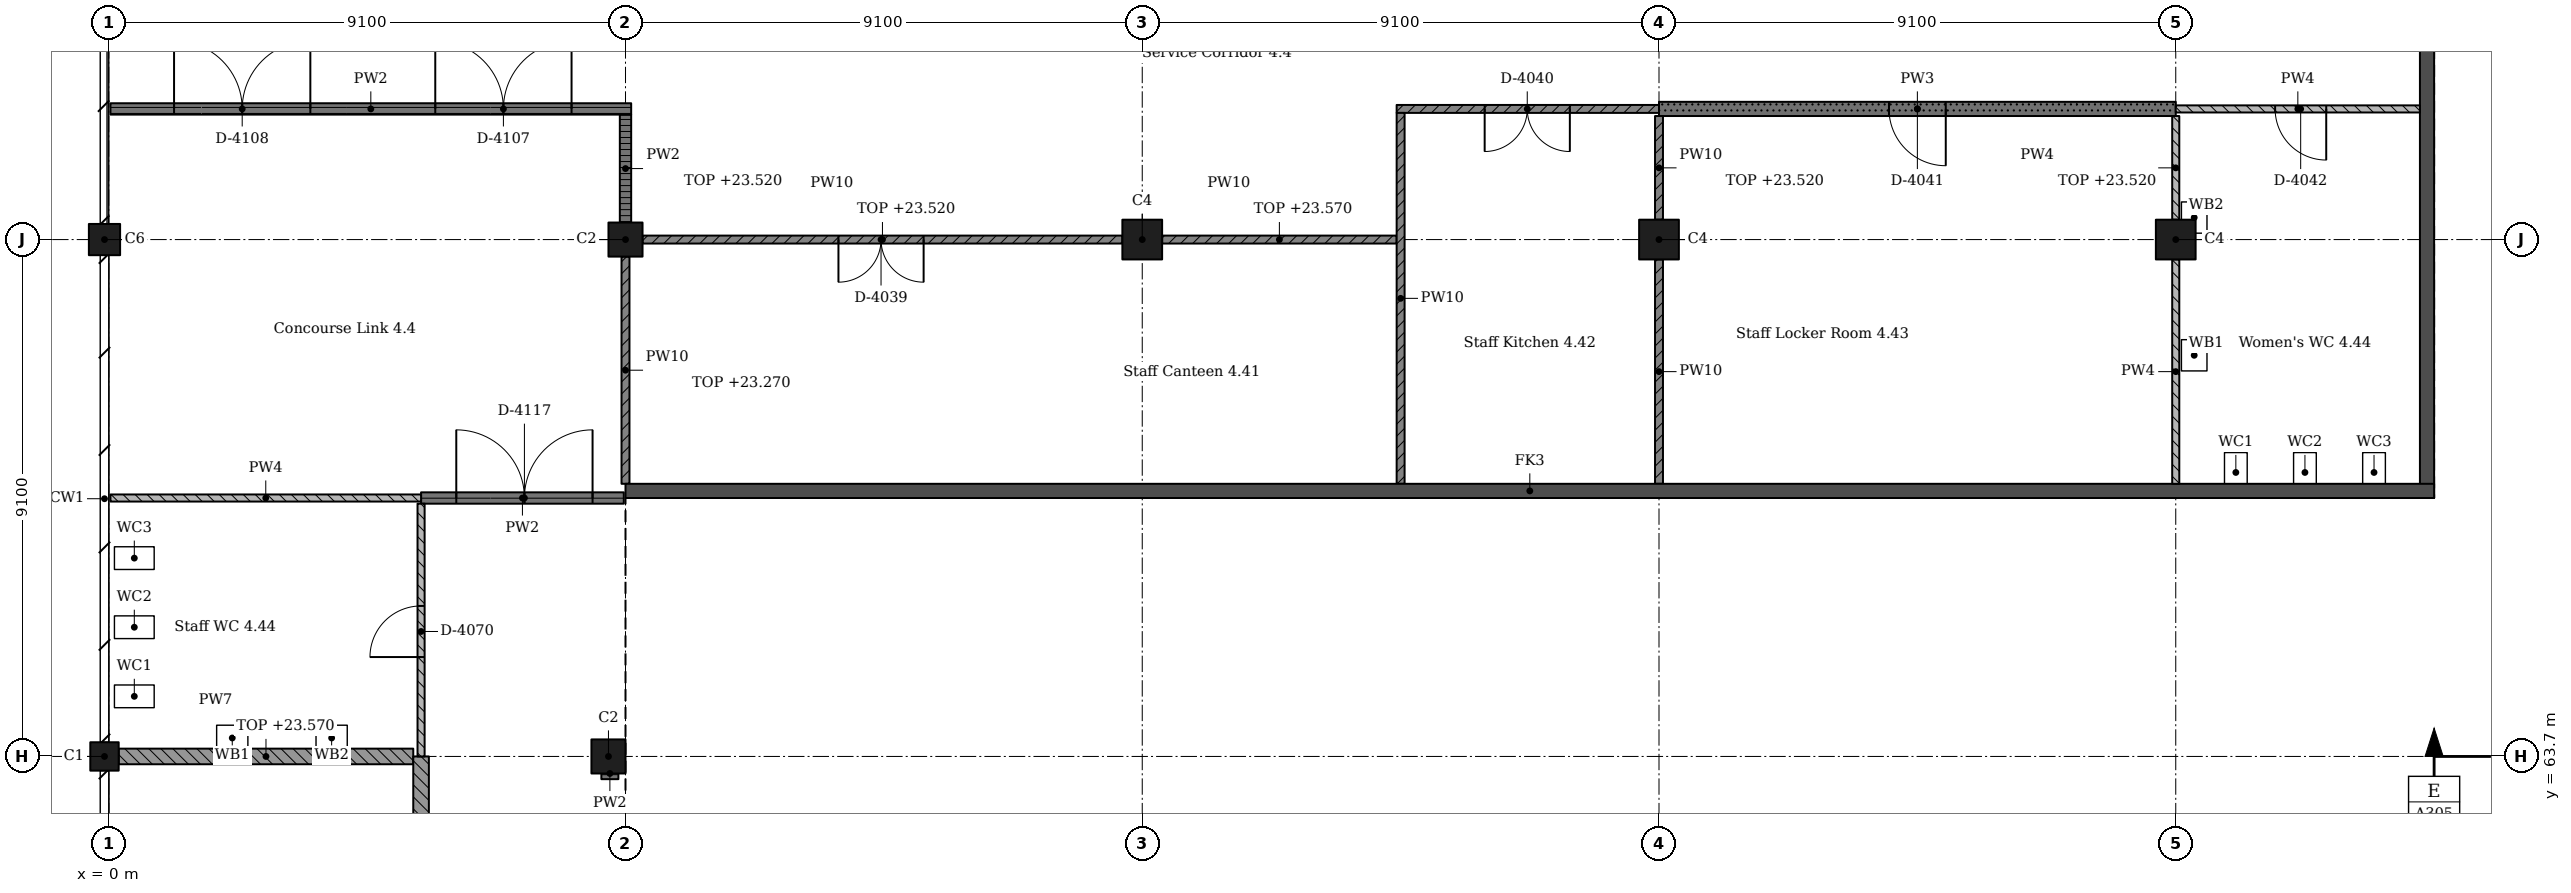
"""IFC4 building model, lengths in metres.
Left out: names, types, materials, properties, quantities, classifications, styles, units other than length and angle.
Written with IfcOpenShell. Run it as: python <this file> out.ifc"""

import sys

from ifc_helpers import new_model, si_unit, direction, frame, frame_2d, origin, origin_2d, place, context, subcontext, project, spatial, rectangle, extrude, element, fill, save


model = new_model("IFC4")
c1 = context("Model", 3, precision=1e-05, world=origin(), true_north=direction((0.0, 1.0)))
c2 = subcontext(c1, "Body", "Model", "MODEL_VIEW")
j1 = project(units=[si_unit("LENGTHUNIT", "METRE"), si_unit("PLANEANGLEUNIT", "RADIAN")], contexts=[c1])
p1 = place(None, origin())
s1 = spatial("IfcSite", under=j1, at=p1, CompositionType="ELEMENT")
p2 = place(p1, origin())
s2 = spatial("IfcBuilding", under=s1, at=p2, CompositionType="ELEMENT")
p3 = place(p2, frame((0.0, 0.0, 20.02)))
s3 = spatial("IfcBuildingStorey", under=s2, at=p3, CompositionType="ELEMENT", Elevation=20.02)
p4 = place(p3, frame((-0.075, 63.7, 0.0), z_axis=(0.0, 0.0, 1.0), x_axis=(1.0, 0.0, 0.0)))
e1 = element("IfcColumn", 1, at=p4, inside=s3, PredefinedType="COLUMN", context=c2, shape_type="SweptSolid", body=[
    extrude(rectangle(XDim=0.5, YDim=0.5, at=origin_2d()), origin(), (0.0, 0.0, 1.0), 4.55),
])
p5 = place(p3, frame((-0.075, 72.8, 0.0), z_axis=(0.0, 0.0, 1.0), x_axis=(1.0, 0.0, 0.0)))
e2 = element("IfcColumn", 2, at=p5, inside=s3, PredefinedType="COLUMN", context=c2, shape_type="SweptSolid", body=[
    extrude(rectangle(XDim=0.55, YDim=0.55, at=origin_2d()), origin(), (0.0, 0.0, 1.0), 4.55),
])
for number, where, z_axis, x_axis in (
    (3, (8.8, 63.7, 0.0), (0.0, 0.0, 1.0), (1.0, 0.0, 0.0)),
    (4, (9.1, 72.8, 0.0), (0.0, 0.0, 1.0), (1.0, 0.0, 0.0)),
):
    element("IfcColumn", number, at=place(p3, frame(where, z_axis=z_axis, x_axis=x_axis)), inside=s3, PredefinedType="COLUMN", context=c2, shape_type="SweptSolid", body=[
        extrude(rectangle(XDim=0.6, YDim=0.6, at=origin_2d()), origin(), (0.0, 0.0, 1.0), 4.55),
    ])
for number, where, z_axis, x_axis in (
    (5, (18.2, 72.8, 0.0), (0.0, 0.0, 1.0), (1.0, 0.0, 0.0)),
    (6, (27.3, 72.8, 0.0), (0.0, 0.0, 1.0), (1.0, 0.0, 0.0)),
    (7, (36.4, 72.8, 0.0), (0.0, 0.0, 1.0), (1.0, 0.0, 0.0)),
):
    element("IfcColumn", number, at=place(p3, frame(where, z_axis=z_axis, x_axis=x_axis)), inside=s3, PredefinedType="COLUMN", context=c2, shape_type="SweptSolid", body=[
        extrude(rectangle(XDim=0.7, YDim=0.7, at=origin_2d()), origin(), (0.0, 0.0, 1.0), 4.55),
    ])
p6 = place(p3, frame((40.825, 68.25, 0.0), z_axis=(0.0, 0.0, 1.0), x_axis=(0.0, 1.0, 0.0)))
e8 = element("IfcWall", 8, at=p6, inside=s3, PredefinedType="SHEAR", context=c2, shape_type="SweptSolid", body=[
    extrude(rectangle(XDim=31.85, YDim=0.25, at=frame_2d((15.925, 0.0))), origin(), (0.0, 0.0, 1.0), 4.55),
])
p7 = place(p3, frame((40.95, 68.375, 0.0), z_axis=(0.0, 0.0, 1.0), x_axis=(-1.0, 0.0, 0.0)))
e9 = element("IfcWall", 9, at=p7, inside=s3, PredefinedType="SHEAR", context=c2, shape_type="SweptSolid", body=[
    extrude(rectangle(XDim=31.85, YDim=0.25, at=frame_2d((15.925, 0.0))), origin(), (0.0, 0.0, 1.0), 4.55),
])
p8 = place(p3, frame((0.175, 63.7, 0.0), z_axis=(0.0, 0.0, 1.0), x_axis=(1.0, 0.0, 0.0)))
e10 = element("IfcWall", 10, at=p8, inside=s3, PredefinedType="SOLIDWALL", context=c2, shape_type="SweptSolid", body=[
    extrude(rectangle(XDim=5.188, YDim=0.275, at=frame_2d((2.594, 0.0))), origin(), (0.0, 0.0, 1.0), 3.55),
])
p9 = place(p3, frame((5.5, 54.6, 0.0), z_axis=(0.0, 0.0, 1.0), x_axis=(0.0, 1.0, 0.0)))
e11 = element("IfcWall", 11, at=p9, inside=s3, PredefinedType="SOLIDWALL", context=c2, shape_type="SweptSolid", body=[
    extrude(rectangle(XDim=9.1, YDim=0.275, at=frame_2d((4.55, 0.0))), origin(), (0.0, 0.0, 1.0), 4.25),
])
p10 = place(p9, frame((3.95, 0.0, 0.0)))
e12 = element("IfcOpeningElement", 12, at=p10, cuts=e11, PredefinedType="OPENING", context=c2, shape_type="SweptSolid", body=[
    extrude(rectangle(XDim=1.2, YDim=2.4, at=frame_2d((0.6, 1.2))), frame((0.0, 0.147, 0.0), z_axis=(0.0, -1.0, 0.0), x_axis=(1.0, 0.0, 0.0)), (0.0, 0.0, 1.0), 0.295),
])
p11 = place(p3, frame((5.5, 63.7, 0.0), z_axis=(0.0, 0.0, 1.0), x_axis=(0.0, 1.0, 0.0)))
e13 = element("IfcWall", 13, at=p11, inside=s3, PredefinedType="PARTITIONING", context=c2, shape_type="SweptSolid", body=[
    extrude(rectangle(XDim=4.45, YDim=0.125, at=frame_2d((2.225, 0.0))), origin(), (0.0, 0.0, 1.0), 4.25),
])
p12 = place(p11, frame((1.75, 0.0, 0.0)))
e14 = element("IfcOpeningElement", 14, at=p12, cuts=e13, PredefinedType="OPENING", context=c2, shape_type="SweptSolid", body=[
    extrude(rectangle(XDim=0.9, YDim=2.1, at=frame_2d((0.45, 1.05))), frame((0.0, 0.073, 0.0), z_axis=(0.0, -1.0, 0.0), x_axis=(1.0, 0.0, 0.0)), (0.0, 0.0, 1.0), 0.145),
])
p13 = place(p3, frame((5.5, 68.25, 0.0), z_axis=(0.0, 0.0, 1.0), x_axis=(-1.0, 0.0, 0.0)))
e15 = element("IfcWall", 15, at=p13, inside=s3, PredefinedType="PARTITIONING", context=c2, shape_type="SweptSolid", body=[
    extrude(rectangle(XDim=5.47, YDim=0.125, at=frame_2d((2.735, 0.0))), origin(), (0.0, 0.0, 1.0), 4.25),
])
p14 = place(p3, frame((8.675, 63.4, 0.0), z_axis=(0.0, 0.0, 1.0), x_axis=(1.0, 0.0, 0.0)))
e16 = element("IfcWall", 16, at=p14, inside=s3, PredefinedType="PARTITIONING", context=c2, shape_type="SweptSolid", body=[
    extrude(rectangle(XDim=0.3, YDim=0.2, at=frame_2d((0.15, 0.0))), origin(), (0.0, 0.0, 1.0), 4.25),
])
p15 = place(p3, frame((9.07, 68.25, 0.0), z_axis=(0.0, 0.0, 1.0), x_axis=(-1.0, 0.0, 0.0)))
e17 = element("IfcWall", 17, at=p15, inside=s3, PredefinedType="PARTITIONING", context=c2, shape_type="SweptSolid", body=[
    extrude(rectangle(XDim=3.57, YDim=0.2, at=frame_2d((1.785, 0.0))), origin(), (0.0, 0.0, 1.0), 4.25),
])
p16 = place(p15, frame((0.55, 0.0, 0.0)))
e18 = element("IfcOpeningElement", 18, at=p16, cuts=e17, PredefinedType="OPENING", context=c2, shape_type="SweptSolid", body=[
    extrude(rectangle(XDim=2.4, YDim=2.4, at=frame_2d((1.2, 1.2))), frame((0.0, 0.11, 0.0), z_axis=(0.0, -1.0, 0.0), x_axis=(1.0, 0.0, 0.0)), (0.0, 0.0, 1.0), 0.22),
])
p17 = place(p3, frame((9.1, 68.5, 0.0), z_axis=(0.0, 0.0, 1.0), x_axis=(0.0, 1.0, 0.0)))
e19 = element("IfcWall", 19, at=p17, inside=s3, PredefinedType="SOLIDWALL", context=c2, shape_type="SweptSolid", body=[
    extrude(rectangle(XDim=4.0, YDim=0.14, at=frame_2d((2.0, 0.0))), origin(), (0.0, 0.0, 1.0), 3.25),
])
p18 = place(p3, frame((9.1, 73.1, 0.0), z_axis=(0.0, 0.0, 1.0), x_axis=(0.0, 1.0, 0.0)))
e20 = element("IfcWall", 20, at=p18, inside=s3, PredefinedType="PARTITIONING", context=c2, shape_type="SweptSolid", body=[
    extrude(rectangle(XDim=1.9, YDim=0.2, at=frame_2d((0.95, 0.0))), origin(), (0.0, 0.0, 1.0), 3.5),
])
p19 = place(p3, frame((9.2, 75.1, 0.0), z_axis=(0.0, 0.0, 1.0), x_axis=(-1.0, 0.0, 0.0)))
e21 = element("IfcWall", 21, at=p19, inside=s3, PredefinedType="PARTITIONING", context=c2, shape_type="SweptSolid", body=[
    extrude(rectangle(XDim=9.17, YDim=0.2, at=frame_2d((4.585, 0.0))), origin(), (0.0, 0.0, 1.0), 4.25),
])
p20 = place(p19, frame((1.05, 0.0, 0.0)))
e22 = element("IfcOpeningElement", 22, at=p20, cuts=e21, PredefinedType="OPENING", context=c2, shape_type="SweptSolid", body=[
    extrude(rectangle(XDim=2.4, YDim=2.4, at=frame_2d((1.2, 1.2))), frame((0.0, 0.11, 0.0), z_axis=(0.0, -1.0, 0.0), x_axis=(1.0, 0.0, 0.0)), (0.0, 0.0, 1.0), 0.22),
])
p21 = place(p19, frame((5.65, 0.0, 0.0)))
e23 = element("IfcOpeningElement", 23, at=p21, cuts=e21, PredefinedType="OPENING", context=c2, shape_type="SweptSolid", body=[
    extrude(rectangle(XDim=2.4, YDim=2.4, at=frame_2d((1.2, 1.2))), frame((0.0, 0.11, 0.0), z_axis=(0.0, -1.0, 0.0), x_axis=(1.0, 0.0, 0.0)), (0.0, 0.0, 1.0), 0.22),
])
p22 = place(p3, frame((9.4, 72.8, 0.0), z_axis=(0.0, 0.0, 1.0), x_axis=(1.0, 0.0, 0.0)))
e24 = element("IfcWall", 24, at=p22, inside=s3, PredefinedType="SOLIDWALL", context=c2, shape_type="SweptSolid", body=[
    extrude(rectangle(XDim=8.45, YDim=0.14, at=frame_2d((4.225, 0.0))), origin(), (0.0, 0.0, 1.0), 3.5),
])
p23 = place(p22, frame((3.45, 0.0, 0.0)))
e25 = element("IfcOpeningElement", 25, at=p23, cuts=e24, PredefinedType="OPENING", context=c2, shape_type="SweptSolid", body=[
    extrude(rectangle(XDim=1.5, YDim=2.1, at=frame_2d((0.75, 1.05))), frame((0.0, 0.08, 0.0), z_axis=(0.0, -1.0, 0.0), x_axis=(1.0, 0.0, 0.0)), (0.0, 0.0, 1.0), 0.16),
])
p24 = place(p3, frame((18.55, 72.8, 0.0), z_axis=(0.0, 0.0, 1.0), x_axis=(1.0, 0.0, 0.0)))
e26 = element("IfcWall", 26, at=p24, inside=s3, PredefinedType="SOLIDWALL", context=c2, shape_type="SweptSolid", body=[
    extrude(rectangle(XDim=4.13, YDim=0.14, at=frame_2d((2.065, 0.0))), origin(), (0.0, 0.0, 1.0), 3.55),
])
p25 = place(p3, frame((22.68, 75.1, 0.0), z_axis=(0.0, 0.0, 1.0), x_axis=(1.0, 0.0, 0.0)))
e27 = element("IfcWall", 27, at=p25, inside=s3, PredefinedType="SOLIDWALL", context=c2, shape_type="SweptSolid", body=[
    extrude(rectangle(XDim=4.62, YDim=0.14, at=frame_2d((2.31, 0.0))), origin(), (0.0, 0.0, 1.0), 4.25),
])
p26 = place(p25, frame((1.55, 0.0, 0.0)))
e28 = element("IfcOpeningElement", 28, at=p26, cuts=e27, PredefinedType="OPENING", context=c2, shape_type="SweptSolid", body=[
    extrude(rectangle(XDim=1.5, YDim=2.1, at=frame_2d((0.75, 1.05))), frame((0.0, 0.08, 0.0), z_axis=(0.0, -1.0, 0.0), x_axis=(1.0, 0.0, 0.0)), (0.0, 0.0, 1.0), 0.16),
])
p27 = place(p3, frame((22.75, 68.5, 0.0), z_axis=(0.0, 0.0, 1.0), x_axis=(0.0, 1.0, 0.0)))
e29 = element("IfcWall", 29, at=p27, inside=s3, PredefinedType="SOLIDWALL", context=c2, shape_type="SweptSolid", body=[
    extrude(rectangle(XDim=6.53, YDim=0.14, at=frame_2d((3.265, 0.0))), origin(), (0.0, 0.0, 1.0), 4.25),
])
p28 = place(p3, frame((27.3, 72.45, 0.0), z_axis=(0.0, 0.0, 1.0), x_axis=(0.0, -1.0, 0.0)))
e30 = element("IfcWall", 30, at=p28, inside=s3, PredefinedType="SOLIDWALL", context=c2, shape_type="SweptSolid", body=[
    extrude(rectangle(XDim=3.95, YDim=0.14, at=frame_2d((1.975, 0.0))), origin(), (0.0, 0.0, 1.0), 4.25),
])
p29 = place(p3, frame((27.3, 74.975, 0.0), z_axis=(0.0, 0.0, 1.0), x_axis=(0.0, -1.0, 0.0)))
e31 = element("IfcWall", 31, at=p29, inside=s3, PredefinedType="SOLIDWALL", context=c2, shape_type="SweptSolid", body=[
    extrude(rectangle(XDim=1.825, YDim=0.14, at=frame_2d((0.913, 0.0))), origin(), (0.0, 0.0, 1.0), 3.5),
])
p30 = place(p3, frame((27.3, 75.1, 0.0), z_axis=(0.0, 0.0, 1.0), x_axis=(1.0, 0.0, 0.0)))
e32 = element("IfcWall", 32, at=p30, inside=s3, PredefinedType="SOLIDWALL", context=c2, shape_type="SweptSolid", body=[
    extrude(rectangle(XDim=9.1, YDim=0.25, at=frame_2d((4.55, 0.0))), origin(), (0.0, 0.0, 1.0), 4.25),
])
p31 = place(p30, frame((4.05, 0.0, 0.0)))
e33 = element("IfcOpeningElement", 33, at=p31, cuts=e32, PredefinedType="OPENING", context=c2, shape_type="SweptSolid", body=[
    extrude(rectangle(XDim=1.0, YDim=2.1, at=frame_2d((0.5, 1.05))), frame((0.0, 0.135, 0.0), z_axis=(0.0, -1.0, 0.0), x_axis=(1.0, 0.0, 0.0)), (0.0, 0.0, 1.0), 0.27),
])
p32 = place(p3, frame((36.4, 72.45, 0.0), z_axis=(0.0, 0.0, 1.0), x_axis=(0.0, -1.0, 0.0)))
e34 = element("IfcWall", 34, at=p32, inside=s3, PredefinedType="PARTITIONING", context=c2, shape_type="SweptSolid", body=[
    extrude(rectangle(XDim=3.95, YDim=0.125, at=frame_2d((1.975, 0.0))), origin(), (0.0, 0.0, 1.0), 4.25),
])
p33 = place(p3, frame((36.4, 74.975, 0.0), z_axis=(0.0, 0.0, 1.0), x_axis=(0.0, -1.0, 0.0)))
e35 = element("IfcWall", 35, at=p33, inside=s3, PredefinedType="PARTITIONING", context=c2, shape_type="SweptSolid", body=[
    extrude(rectangle(XDim=1.825, YDim=0.125, at=frame_2d((0.913, 0.0))), origin(), (0.0, 0.0, 1.0), 3.5),
])
p34 = place(p3, frame((36.4, 75.1, 0.0), z_axis=(0.0, 0.0, 1.0), x_axis=(1.0, 0.0, 0.0)))
e36 = element("IfcWall", 36, at=p34, inside=s3, PredefinedType="PARTITIONING", context=c2, shape_type="SweptSolid", body=[
    extrude(rectangle(XDim=4.3, YDim=0.125, at=frame_2d((2.15, 0.0))), origin(), (0.0, 0.0, 1.0), 4.25),
])
p35 = place(p34, frame((1.75, 0.0, 0.0)))
e37 = element("IfcOpeningElement", 37, at=p35, cuts=e36, PredefinedType="OPENING", context=c2, shape_type="SweptSolid", body=[
    extrude(rectangle(XDim=0.9, YDim=2.1, at=frame_2d((0.45, 1.05))), frame((0.0, 0.073, 0.0), z_axis=(0.0, -1.0, 0.0), x_axis=(1.0, 0.0, 0.0)), (0.0, 0.0, 1.0), 0.145),
])
p36 = place(p23, origin())
e38 = element("IfcDoor", 38, at=p36, inside=s3, OperationType="DOUBLE_DOOR_SINGLE_SWING", PredefinedType="DOOR", context=c2, shape_type="SweptSolid", body=[
    extrude(rectangle(XDim=1.5, YDim=2.1, at=frame_2d((0.75, 1.05))), frame((0.0, 0.025, 0.0), z_axis=(0.0, -1.0, 0.0), x_axis=(1.0, 0.0, 0.0)), (0.0, 0.0, 1.0), 0.05),
])
fill(e25, e38)
p37 = place(p26, origin())
e39 = element("IfcDoor", 39, at=p37, inside=s3, OperationType="DOUBLE_DOOR_SINGLE_SWING", PredefinedType="DOOR", context=c2, shape_type="SweptSolid", body=[
    extrude(rectangle(XDim=1.5, YDim=2.1, at=frame_2d((0.75, 1.05))), frame((0.0, 0.025, 0.0), z_axis=(0.0, -1.0, 0.0), x_axis=(1.0, 0.0, 0.0)), (0.0, 0.0, 1.0), 0.05),
])
fill(e28, e39)
p38 = place(p31, origin())
e40 = element("IfcDoor", 40, at=p38, inside=s3, OperationType="SINGLE_SWING_RIGHT", PredefinedType="DOOR", context=c2, shape_type="SweptSolid", body=[
    extrude(rectangle(XDim=1.0, YDim=2.1, at=frame_2d((0.5, 1.05))), frame((0.0, 0.025, 0.0), z_axis=(0.0, -1.0, 0.0), x_axis=(1.0, 0.0, 0.0)), (0.0, 0.0, 1.0), 0.05),
])
fill(e33, e40)
p39 = place(p35, origin())
e41 = element("IfcDoor", 41, at=p39, inside=s3, OperationType="SINGLE_SWING_RIGHT", PredefinedType="DOOR", context=c2, shape_type="SweptSolid", body=[
    extrude(rectangle(XDim=0.9, YDim=2.1, at=frame_2d((0.45, 1.05))), frame((0.0, 0.025, 0.0), z_axis=(0.0, -1.0, 0.0), x_axis=(1.0, 0.0, 0.0)), (0.0, 0.0, 1.0), 0.05),
])
fill(e37, e41)
p40 = place(p12, origin())
e42 = element("IfcDoor", 42, at=p40, inside=s3, OperationType="SINGLE_SWING_RIGHT", PredefinedType="DOOR", context=c2, shape_type="SweptSolid", body=[
    extrude(rectangle(XDim=0.9, YDim=2.1, at=frame_2d((0.45, 1.05))), frame((0.0, 0.025, 0.0), z_axis=(0.0, -1.0, 0.0), x_axis=(1.0, 0.0, 0.0)), (0.0, 0.0, 1.0), 0.05),
])
fill(e14, e42)
p41 = place(p20, origin())
e43 = element("IfcDoor", 43, at=p41, inside=s3, OperationType="DOUBLE_DOOR_SINGLE_SWING", PredefinedType="DOOR", context=c2, shape_type="SweptSolid", body=[
    extrude(rectangle(XDim=2.4, YDim=2.4, at=frame_2d((1.2, 1.2))), frame((0.0, 0.025, 0.0), z_axis=(0.0, -1.0, 0.0), x_axis=(1.0, 0.0, 0.0)), (0.0, 0.0, 1.0), 0.05),
])
fill(e22, e43)
p42 = place(p21, origin())
e44 = element("IfcDoor", 44, at=p42, inside=s3, OperationType="DOUBLE_DOOR_SINGLE_SWING", PredefinedType="DOOR", context=c2, shape_type="SweptSolid", body=[
    extrude(rectangle(XDim=2.4, YDim=2.4, at=frame_2d((1.2, 1.2))), frame((0.0, 0.025, 0.0), z_axis=(0.0, -1.0, 0.0), x_axis=(1.0, 0.0, 0.0)), (0.0, 0.0, 1.0), 0.05),
])
fill(e23, e44)
p43 = place(p16, origin())
e45 = element("IfcDoor", 45, at=p43, inside=s3, OperationType="DOUBLE_DOOR_SINGLE_SWING", PredefinedType="DOOR", context=c2, shape_type="SweptSolid", body=[
    extrude(rectangle(XDim=2.4, YDim=2.4, at=frame_2d((1.2, 1.2))), frame((0.0, 0.025, 0.0), z_axis=(0.0, -1.0, 0.0), x_axis=(1.0, 0.0, 0.0)), (0.0, 0.0, 1.0), 0.05),
])
fill(e18, e45)
save(model, sys.argv[1])
